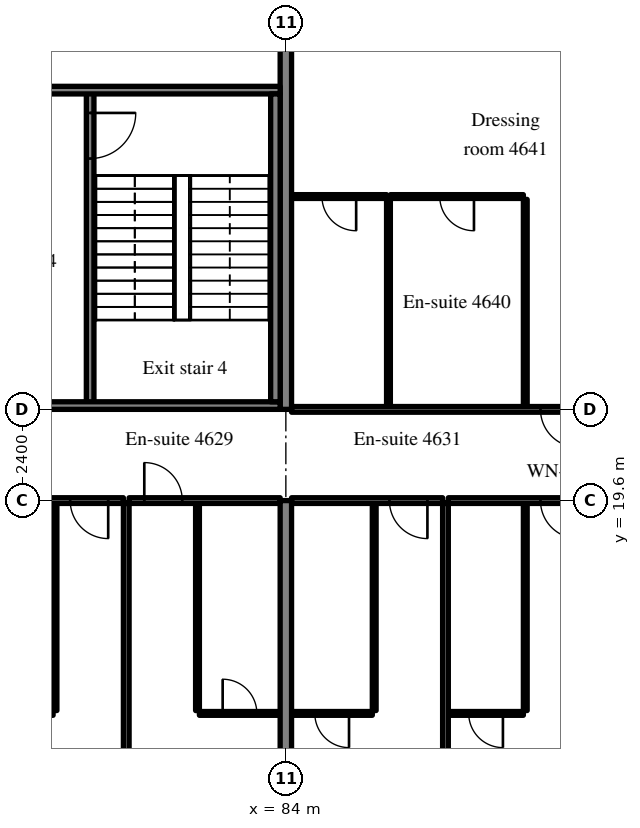
"""IFC4 building model, lengths in metres.
Left out: names, types, materials, properties, quantities, classifications, styles, units other than length and angle.
Written with IfcOpenShell. Run it as: python <this file> out.ifc"""

import sys

from ifc_helpers import new_model, si_unit, direction, frame, frame_2d, origin, place, context, subcontext, project, spatial, rectangle, extrude, source, transform, mapped, element, fill, save


model = new_model("IFC4")
c1 = context("Model", 3, precision=1e-05, world=origin(), true_north=direction((0.0, 1.0)))
c2 = subcontext(c1, "Body", "Model", "MODEL_VIEW")
j1 = project(units=[si_unit("LENGTHUNIT", "METRE"), si_unit("PLANEANGLEUNIT", "RADIAN")], contexts=[c1])
p1 = place(None, origin())
s1 = spatial("IfcSite", under=j1, at=p1, CompositionType="ELEMENT")
p2 = place(p1, origin())
s2 = spatial("IfcBuilding", under=s1, at=p2, CompositionType="ELEMENT")
p3 = place(p2, frame((0.0, 0.0, 189.6)))
s3 = spatial("IfcBuildingStorey", under=s2, at=p3, CompositionType="ELEMENT", Elevation=189.6)
m1 = source(origin(), c2, "Body", "SweptSolid", [
    extrude(rectangle(XDim=14.1, YDim=0.3, at=frame_2d((7.05, 0.0))), origin(), (0.0, 0.0, 1.0), 3.52),
])
p4 = place(p3, frame((84.0, 5.5, 0.0), z_axis=(0.0, 0.0, 1.0), x_axis=(0.0, 1.0, 0.0)))
e1 = element("IfcWall", 1, at=p4, inside=s3, PredefinedType="SHEAR", context=c2, shape_type="MappedRepresentation", body=[
    mapped(m1, transform((0.0, 0.0, 0.0), scale=1.0)),
])
m2 = source(origin(), c2, "Body", "SweptSolid", [
    extrude(rectangle(XDim=20.0, YDim=0.3, at=frame_2d((10.0, 0.0))), origin(), (0.0, 0.0, 1.0), 3.52),
])
p5 = place(p3, frame((84.0, 22.0, 0.0), z_axis=(0.0, 0.0, 1.0), x_axis=(0.0, 1.0, 0.0)))
e2 = element("IfcWall", 2, at=p5, inside=s3, PredefinedType="SHEAR", context=c2, shape_type="MappedRepresentation", body=[
    mapped(m2, transform((0.0, 0.0, 0.0), scale=1.0)),
])
m3 = source(origin(), c2, "Body", "SweptSolid", [
    extrude(rectangle(XDim=8.3, YDim=0.2, at=frame_2d((4.15, 0.0))), origin(), (0.0, 0.0, 1.0), 3.52),
])
p6 = place(p3, frame((78.85, 22.1, 0.0), z_axis=(0.0, 0.0, 1.0), x_axis=(0.0, 1.0, 0.0)))
e3 = element("IfcWall", 3, at=p6, inside=s3, PredefinedType="SOLIDWALL", context=c2, shape_type="MappedRepresentation", body=[
    mapped(m3, transform((0.0, 0.0, 0.0), scale=1.0)),
])
m4 = source(origin(), c2, "Body", "SweptSolid", [
    extrude(rectangle(XDim=1.2, YDim=2.1, at=frame_2d((0.6, 1.05))), frame((0.0, 0.11, 0.0), z_axis=(0.0, -1.0, 0.0), x_axis=(1.0, 0.0, 0.0)), (0.0, 0.0, 1.0), 0.22),
])
p7 = place(p6, frame((6.5, 0.0, 0.0)))
e4 = element("IfcOpeningElement", 4, at=p7, cuts=e3, PredefinedType="OPENING", context=c2, shape_type="MappedRepresentation", body=[
    mapped(m4, transform((0.0, 0.0, 0.0), scale=1.0)),
])
m5 = source(origin(), c2, "Body", "SweptSolid", [
    extrude(rectangle(XDim=8.25, YDim=0.2, at=frame_2d((4.125, 0.0))), origin(), (0.0, 0.0, 1.0), 3.52),
])
p8 = place(p3, frame((83.85, 22.1, 0.0), z_axis=(0.0, 0.0, 1.0), x_axis=(-1.0, 0.0, 0.0)))
e5 = element("IfcWall", 5, at=p8, inside=s3, PredefinedType="SOLIDWALL", context=c2, shape_type="MappedRepresentation", body=[
    mapped(m5, transform((0.0, 0.0, 0.0), scale=1.0)),
])
p9 = place(p8, frame((6.05, 0.0, 0.0)))
e6 = element("IfcOpeningElement", 6, at=p9, cuts=e5, PredefinedType="OPENING", context=c2, shape_type="MappedRepresentation", body=[
    mapped(m4, transform((0.0, 0.0, 0.0), scale=1.0)),
])
p10 = place(p3, frame((83.85, 30.4, 0.0), z_axis=(0.0, 0.0, 1.0), x_axis=(-1.0, 0.0, 0.0)))
e7 = element("IfcWall", 7, at=p10, inside=s3, PredefinedType="SOLIDWALL", context=c2, shape_type="MappedRepresentation", body=[
    mapped(m5, transform((0.0, 0.0, 0.0), scale=1.0)),
])
m6 = source(origin(), c2, "Body", "SweptSolid", [
    extrude(rectangle(XDim=1.0, YDim=2.1, at=frame_2d((0.5, 1.05))), frame((0.0, 0.11, 0.0), z_axis=(0.0, -1.0, 0.0), x_axis=(1.0, 0.0, 0.0)), (0.0, 0.0, 1.0), 0.22),
])
p11 = place(p10, frame((6.15, 0.0, 0.0)))
e8 = element("IfcOpeningElement", 8, at=p11, cuts=e7, PredefinedType="OPENING", context=c2, shape_type="MappedRepresentation", body=[
    mapped(m6, transform((0.0, 0.0, 0.0), scale=1.0)),
])
m7 = source(origin(), c2, "Body", "SweptSolid", [
    extrude(rectangle(XDim=8.1, YDim=0.25, at=frame_2d((4.05, 0.0))), origin(), (0.0, 0.0, 1.0), 3.52),
])
p12 = place(p3, frame((83.725, 22.2, 0.0), z_axis=(0.0, 0.0, 1.0), x_axis=(0.0, 1.0, 0.0)))
e9 = element("IfcWall", 9, at=p12, inside=s3, PredefinedType="SOLIDWALL", context=c2, shape_type="MappedRepresentation", body=[
    mapped(m7, transform((0.0, 0.0, 0.0), scale=1.0)),
])
m8 = source(origin(), c2, "Body", "SweptSolid", [
    extrude(rectangle(XDim=5.45, YDim=0.1, at=frame_2d((2.725, 0.0))), origin(), (0.0, 0.0, 1.0), 3.52),
])
p13 = place(p3, frame((77.925, 14.075, 0.0), z_axis=(0.0, 0.0, 1.0), x_axis=(0.0, 1.0, 0.0)))
e10 = element("IfcWall", 10, at=p13, inside=s3, PredefinedType="PARTITIONING", context=c2, shape_type="MappedRepresentation", body=[
    mapped(m8, transform((0.0, 0.0, 0.0), scale=1.0)),
])
m9 = source(origin(), c2, "Body", "SweptSolid", [
    extrude(rectangle(XDim=2.125, YDim=0.1, at=frame_2d((1.062, 0.0))), origin(), (0.0, 0.0, 1.0), 3.52),
])
p14 = place(p3, frame((75.75, 14.0, 0.0), z_axis=(0.0, 0.0, 1.0), x_axis=(1.0, 0.0, 0.0)))
e11 = element("IfcWall", 11, at=p14, inside=s3, PredefinedType="PARTITIONING", context=c2, shape_type="MappedRepresentation", body=[
    mapped(m9, transform((0.0, 0.0, 0.0), scale=1.0)),
])
m10 = source(origin(), c2, "Body", "SweptSolid", [
    extrude(rectangle(XDim=0.9, YDim=2.1, at=frame_2d((0.45, 1.05))), frame((0.0, 0.06, 0.0), z_axis=(0.0, -1.0, 0.0), x_axis=(1.0, 0.0, 0.0)), (0.0, 0.0, 1.0), 0.12),
])
p15 = place(p14, frame((0.612, 0.0, 0.0)))
e12 = element("IfcOpeningElement", 12, at=p15, cuts=e11, PredefinedType="OPENING", context=c2, shape_type="MappedRepresentation", body=[
    mapped(m10, transform((0.0, 0.0, 0.0), scale=1.0)),
])
m11 = source(origin(), c2, "Body", "SweptSolid", [
    extrude(rectangle(XDim=3.975, YDim=0.15, at=frame_2d((1.988, 0.0))), origin(), (0.0, 0.0, 1.0), 2.82),
])
p16 = place(p3, frame((75.75, 19.6, 0.0), z_axis=(0.0, 0.0, 1.0), x_axis=(1.0, 0.0, 0.0)))
e13 = element("IfcWall", 13, at=p16, inside=s3, PredefinedType="PARTITIONING", context=c2, shape_type="MappedRepresentation", body=[
    mapped(m11, transform((0.0, 0.0, 0.0), scale=1.0)),
])
m12 = source(origin(), c2, "Body", "SweptSolid", [
    extrude(rectangle(XDim=1.0, YDim=2.1, at=frame_2d((0.5, 1.05))), frame((0.0, 0.085, 0.0), z_axis=(0.0, -1.0, 0.0), x_axis=(1.0, 0.0, 0.0)), (0.0, 0.0, 1.0), 0.17),
])
p17 = place(p16, frame((2.575, 0.0, 0.0)))
e14 = element("IfcOpeningElement", 14, at=p17, cuts=e13, PredefinedType="OPENING", context=c2, shape_type="MappedRepresentation", body=[
    mapped(m12, transform((0.0, 0.0, 0.0), scale=1.0)),
])
p18 = place(p3, frame((81.675, 14.075, 0.0), z_axis=(0.0, 0.0, 1.0), x_axis=(0.0, 1.0, 0.0)))
e15 = element("IfcWall", 15, at=p18, inside=s3, PredefinedType="PARTITIONING", context=c2, shape_type="MappedRepresentation", body=[
    mapped(m8, transform((0.0, 0.0, 0.0), scale=1.0)),
])
p19 = place(p3, frame((81.725, 14.0, 0.0), z_axis=(0.0, 0.0, 1.0), x_axis=(1.0, 0.0, 0.0)))
e16 = element("IfcWall", 16, at=p19, inside=s3, PredefinedType="PARTITIONING", context=c2, shape_type="MappedRepresentation", body=[
    mapped(m9, transform((0.0, 0.0, 0.0), scale=1.0)),
])
p20 = place(p19, frame((0.612, 0.0, 0.0)))
e17 = element("IfcOpeningElement", 17, at=p20, cuts=e16, PredefinedType="OPENING", context=c2, shape_type="MappedRepresentation", body=[
    mapped(m10, transform((0.0, 0.0, 0.0), scale=1.0)),
])
p21 = place(p3, frame((79.875, 19.6, 0.0), z_axis=(0.0, 0.0, 1.0), x_axis=(1.0, 0.0, 0.0)))
e18 = element("IfcWall", 18, at=p21, inside=s3, PredefinedType="PARTITIONING", context=c2, shape_type="MappedRepresentation", body=[
    mapped(m11, transform((0.0, 0.0, 0.0), scale=1.0)),
])
p22 = place(p21, frame((0.4, 0.0, 0.0)))
e19 = element("IfcOpeningElement", 19, at=p22, cuts=e18, PredefinedType="OPENING", context=c2, shape_type="MappedRepresentation", body=[
    mapped(m12, transform((0.0, 0.0, 0.0), scale=1.0)),
])
m13 = source(origin(), c2, "Body", "SweptSolid", [
    extrude(rectangle(XDim=12.275, YDim=0.15, at=frame_2d((6.137, 0.0))), origin(), (0.0, 0.0, 1.0), 3.52),
])
p23 = place(p3, frame((79.8, 7.25, 0.0), z_axis=(0.0, 0.0, 1.0), x_axis=(0.0, 1.0, 0.0)))
e20 = element("IfcWall", 20, at=p23, inside=s3, PredefinedType="PARTITIONING", context=c2, shape_type="MappedRepresentation", body=[
    mapped(m13, transform((0.0, 0.0, 0.0), scale=1.0)),
])
p24 = place(p3, frame((86.325, 14.075, 0.0), z_axis=(0.0, 0.0, 1.0), x_axis=(0.0, 1.0, 0.0)))
e21 = element("IfcWall", 21, at=p24, inside=s3, PredefinedType="PARTITIONING", context=c2, shape_type="MappedRepresentation", body=[
    mapped(m8, transform((0.0, 0.0, 0.0), scale=1.0)),
])
p25 = place(p3, frame((84.15, 14.0, 0.0), z_axis=(0.0, 0.0, 1.0), x_axis=(1.0, 0.0, 0.0)))
e22 = element("IfcWall", 22, at=p25, inside=s3, PredefinedType="PARTITIONING", context=c2, shape_type="MappedRepresentation", body=[
    mapped(m9, transform((0.0, 0.0, 0.0), scale=1.0)),
])
p26 = place(p25, frame((0.612, 0.0, 0.0)))
e23 = element("IfcOpeningElement", 23, at=p26, cuts=e22, PredefinedType="OPENING", context=c2, shape_type="MappedRepresentation", body=[
    mapped(m10, transform((0.0, 0.0, 0.0), scale=1.0)),
])
p27 = place(p3, frame((84.15, 19.6, 0.0), z_axis=(0.0, 0.0, 1.0), x_axis=(1.0, 0.0, 0.0)))
e24 = element("IfcWall", 24, at=p27, inside=s3, PredefinedType="PARTITIONING", context=c2, shape_type="MappedRepresentation", body=[
    mapped(m11, transform((0.0, 0.0, 0.0), scale=1.0)),
])
p28 = place(p27, frame((2.575, 0.0, 0.0)))
e25 = element("IfcOpeningElement", 25, at=p28, cuts=e24, PredefinedType="OPENING", context=c2, shape_type="MappedRepresentation", body=[
    mapped(m12, transform((0.0, 0.0, 0.0), scale=1.0)),
])
p29 = place(p3, frame((90.3, 14.075, 0.0), z_axis=(0.0, 0.0, 1.0), x_axis=(0.0, 1.0, 0.0)))
e26 = element("IfcWall", 26, at=p29, inside=s3, PredefinedType="PARTITIONING", context=c2, shape_type="MappedRepresentation", body=[
    mapped(m8, transform((0.0, 0.0, 0.0), scale=1.0)),
])
m14 = source(origin(), c2, "Body", "SweptSolid", [
    extrude(rectangle(XDim=1.975, YDim=0.1, at=frame_2d((0.988, 0.0))), origin(), (0.0, 0.0, 1.0), 3.52),
])
p30 = place(p3, frame((88.275, 14.0, 0.0), z_axis=(0.0, 0.0, 1.0), x_axis=(1.0, 0.0, 0.0)))
e27 = element("IfcWall", 27, at=p30, inside=s3, PredefinedType="PARTITIONING", context=c2, shape_type="MappedRepresentation", body=[
    mapped(m14, transform((0.0, 0.0, 0.0), scale=1.0)),
])
p31 = place(p30, frame((0.537, 0.0, 0.0)))
e28 = element("IfcOpeningElement", 28, at=p31, cuts=e27, PredefinedType="OPENING", context=c2, shape_type="MappedRepresentation", body=[
    mapped(m10, transform((0.0, 0.0, 0.0), scale=1.0)),
])
m15 = source(origin(), c2, "Body", "SweptSolid", [
    extrude(rectangle(XDim=3.825, YDim=0.15, at=frame_2d((1.913, 0.0))), origin(), (0.0, 0.0, 1.0), 2.82),
])
p32 = place(p3, frame((88.275, 19.6, 0.0), z_axis=(0.0, 0.0, 1.0), x_axis=(1.0, 0.0, 0.0)))
e29 = element("IfcWall", 29, at=p32, inside=s3, PredefinedType="PARTITIONING", context=c2, shape_type="MappedRepresentation", body=[
    mapped(m15, transform((0.0, 0.0, 0.0), scale=1.0)),
])
p33 = place(p32, frame((2.425, 0.0, 0.0)))
e30 = element("IfcOpeningElement", 30, at=p33, cuts=e29, PredefinedType="OPENING", context=c2, shape_type="MappedRepresentation", body=[
    mapped(m12, transform((0.0, 0.0, 0.0), scale=1.0)),
])
m16 = source(origin(), c2, "Body", "SweptSolid", [
    extrude(rectangle(XDim=13.447, YDim=0.15, at=frame_2d((6.724, 0.0))), origin(), (0.0, 0.0, 1.0), 3.52),
])
p34 = place(p3, frame((88.2, 6.078, 0.0), z_axis=(0.0, 0.0, 1.0), x_axis=(0.0, 1.0, 0.0)))
e31 = element("IfcWall", 31, at=p34, inside=s3, PredefinedType="PARTITIONING", context=c2, shape_type="MappedRepresentation", body=[
    mapped(m16, transform((0.0, 0.0, 0.0), scale=1.0)),
])
for number, where, z_axis, x_axis in (
    (32, (90.3, 22.075, 0.0), (0.0, 0.0, 1.0), (0.0, 1.0, 0.0)),
    (33, (86.7, 22.075, 0.0), (0.0, 0.0, 1.0), (0.0, 1.0, 0.0)),
):
    element("IfcWall", number, at=place(p3, frame(where, z_axis=z_axis, x_axis=x_axis)), inside=s3, PredefinedType="PARTITIONING", context=c2, shape_type="MappedRepresentation", body=[
        mapped(m8, transform((0.0, 0.0, 0.0), scale=1.0)),
    ])
m17 = source(origin(), c2, "Body", "SweptSolid", [
    extrude(rectangle(XDim=3.5, YDim=0.1, at=frame_2d((1.75, 0.0))), origin(), (0.0, 0.0, 1.0), 3.52),
])
p35 = place(p3, frame((86.75, 27.6, 0.0), z_axis=(0.0, 0.0, 1.0), x_axis=(1.0, 0.0, 0.0)))
e34 = element("IfcWall", 34, at=p35, inside=s3, PredefinedType="PARTITIONING", context=c2, shape_type="MappedRepresentation", body=[
    mapped(m17, transform((0.0, 0.0, 0.0), scale=1.0)),
])
p36 = place(p35, frame((1.3, 0.0, 0.0)))
e35 = element("IfcOpeningElement", 35, at=p36, cuts=e34, PredefinedType="OPENING", context=c2, shape_type="MappedRepresentation", body=[
    mapped(m10, transform((0.0, 0.0, 0.0), scale=1.0)),
])
m18 = source(origin(), c2, "Body", "SweptSolid", [
    extrude(rectangle(XDim=2.5, YDim=0.1, at=frame_2d((1.25, 0.0))), origin(), (0.0, 0.0, 1.0), 3.52),
])
p37 = place(p3, frame((84.15, 27.6, 0.0), z_axis=(0.0, 0.0, 1.0), x_axis=(1.0, 0.0, 0.0)))
e36 = element("IfcWall", 36, at=p37, inside=s3, PredefinedType="PARTITIONING", context=c2, shape_type="MappedRepresentation", body=[
    mapped(m18, transform((0.0, 0.0, 0.0), scale=1.0)),
])
p38 = place(p37, frame((0.8, 0.0, 0.0)))
e37 = element("IfcOpeningElement", 37, at=p38, cuts=e36, PredefinedType="OPENING", context=c2, shape_type="MappedRepresentation", body=[
    mapped(m10, transform((0.0, 0.0, 0.0), scale=1.0)),
])
m19 = source(origin(), c2, "Body", "SweptSolid", [
    extrude(rectangle(XDim=7.95, YDim=0.15, at=frame_2d((3.975, 0.0))), origin(), (0.0, 0.0, 1.0), 2.82),
])
p39 = place(p3, frame((84.15, 22.0, 0.0), z_axis=(0.0, 0.0, 1.0), x_axis=(1.0, 0.0, 0.0)))
e38 = element("IfcWall", 38, at=p39, inside=s3, PredefinedType="PARTITIONING", context=c2, shape_type="MappedRepresentation", body=[
    mapped(m19, transform((0.0, 0.0, 0.0), scale=1.0)),
])
p40 = place(p39, frame((6.55, 0.0, 0.0)))
e39 = element("IfcOpeningElement", 39, at=p40, cuts=e38, PredefinedType="OPENING", context=c2, shape_type="MappedRepresentation", body=[
    mapped(m12, transform((0.0, 0.0, 0.0), scale=1.0)),
])
m20 = source(origin(), c2, "Body", "SweptSolid", [
    extrude(rectangle(XDim=1.2, YDim=2.1, at=frame_2d((0.6, 1.05))), frame((0.0, 0.025, 0.0), z_axis=(0.0, -1.0, 0.0), x_axis=(1.0, 0.0, 0.0)), (0.0, 0.0, 1.0), 0.05),
])
p41 = place(p7, origin())
e40 = element("IfcDoor", 40, at=p41, inside=s3, OperationType="SINGLE_SWING_RIGHT", PredefinedType="DOOR", context=c2, shape_type="MappedRepresentation", body=[
    mapped(m20, transform((0.0, 0.0, 0.0), scale=1.0)),
])
fill(e4, e40)
m21 = source(origin(), c2, "Body", "SweptSolid", [
    extrude(rectangle(XDim=1.0, YDim=2.1, at=frame_2d((0.5, 1.05))), frame((0.0, 0.025, 0.0), z_axis=(0.0, -1.0, 0.0), x_axis=(1.0, 0.0, 0.0)), (0.0, 0.0, 1.0), 0.05),
])
p42 = place(p17, origin())
e41 = element("IfcDoor", 41, at=p42, inside=s3, OperationType="SINGLE_SWING_RIGHT", PredefinedType="DOOR", context=c2, shape_type="MappedRepresentation", body=[
    mapped(m21, transform((0.0, 0.0, 0.0), scale=1.0)),
])
fill(e14, e41)
m22 = source(origin(), c2, "Body", "SweptSolid", [
    extrude(rectangle(XDim=0.9, YDim=2.1, at=frame_2d((0.45, 1.05))), frame((0.0, 0.025, 0.0), z_axis=(0.0, -1.0, 0.0), x_axis=(1.0, 0.0, 0.0)), (0.0, 0.0, 1.0), 0.05),
])
p43 = place(p20, origin())
e42 = element("IfcDoor", 42, at=p43, inside=s3, OperationType="SINGLE_SWING_LEFT", PredefinedType="DOOR", context=c2, shape_type="MappedRepresentation", body=[
    mapped(m22, transform((0.0, 0.0, 0.0), scale=1.0)),
])
fill(e17, e42)
p44 = place(p22, origin())
e43 = element("IfcDoor", 43, at=p44, inside=s3, OperationType="SINGLE_SWING_LEFT", PredefinedType="DOOR", context=c2, shape_type="MappedRepresentation", body=[
    mapped(m21, transform((0.0, 0.0, 0.0), scale=1.0)),
])
fill(e19, e43)
p45 = place(p26, origin())
e44 = element("IfcDoor", 44, at=p45, inside=s3, OperationType="SINGLE_SWING_RIGHT", PredefinedType="DOOR", context=c2, shape_type="MappedRepresentation", body=[
    mapped(m22, transform((0.0, 0.0, 0.0), scale=1.0)),
])
fill(e23, e44)
p46 = place(p28, origin())
e45 = element("IfcDoor", 45, at=p46, inside=s3, OperationType="SINGLE_SWING_RIGHT", PredefinedType="DOOR", context=c2, shape_type="MappedRepresentation", body=[
    mapped(m21, transform((0.0, 0.0, 0.0), scale=1.0)),
])
fill(e25, e45)
p47 = place(p31, origin())
e46 = element("IfcDoor", 46, at=p47, inside=s3, OperationType="SINGLE_SWING_RIGHT", PredefinedType="DOOR", context=c2, shape_type="MappedRepresentation", body=[
    mapped(m22, transform((0.0, 0.0, 0.0), scale=1.0)),
])
fill(e28, e46)
p48 = place(p33, origin())
e47 = element("IfcDoor", 47, at=p48, inside=s3, OperationType="SINGLE_SWING_RIGHT", PredefinedType="DOOR", context=c2, shape_type="MappedRepresentation", body=[
    mapped(m21, transform((0.0, 0.0, 0.0), scale=1.0)),
])
fill(e30, e47)
p49 = place(p36, origin())
e48 = element("IfcDoor", 48, at=p49, inside=s3, OperationType="SINGLE_SWING_RIGHT", PredefinedType="DOOR", context=c2, shape_type="MappedRepresentation", body=[
    mapped(m22, transform((0.0, 0.0, 0.0), scale=1.0)),
])
fill(e35, e48)
p50 = place(p38, origin())
e49 = element("IfcDoor", 49, at=p50, inside=s3, OperationType="SINGLE_SWING_RIGHT", PredefinedType="DOOR", context=c2, shape_type="MappedRepresentation", body=[
    mapped(m22, transform((0.0, 0.0, 0.0), scale=1.0)),
])
fill(e37, e49)
p51 = place(p40, origin())
e50 = element("IfcDoor", 50, at=p51, inside=s3, OperationType="SINGLE_SWING_RIGHT", PredefinedType="DOOR", context=c2, shape_type="MappedRepresentation", body=[
    mapped(m21, transform((0.0, 0.0, 0.0), scale=1.0)),
])
fill(e39, e50)
save(model, sys.argv[1])
